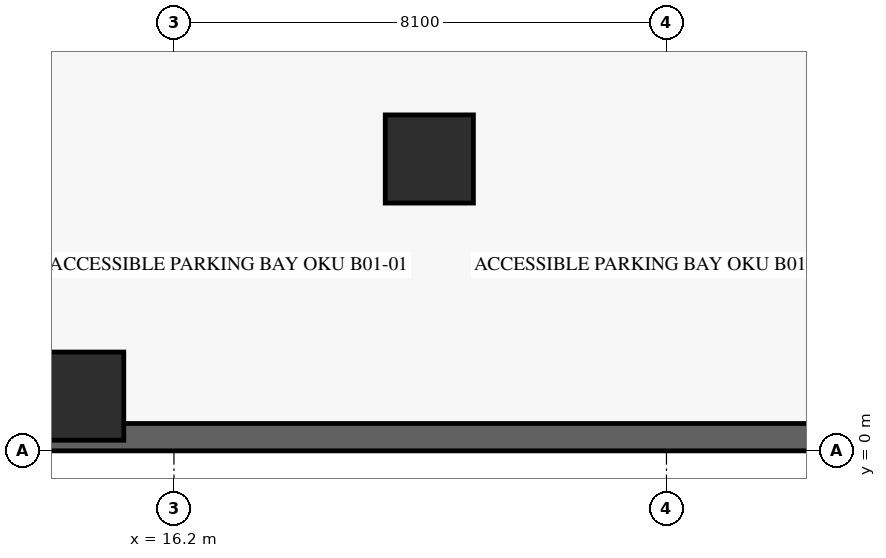
"""IFC4 building model, lengths in metres.
Left out: names, types, materials, properties, quantities, classifications, styles, units other than length and angle.
Written with IfcOpenShell. Run it as: python <this file> out.ifc"""

import sys

from ifc_helpers import new_model, si_unit, direction, frame, frame_2d, origin, origin_2d, place, context, subcontext, project, spatial, rectangle, extrude, source, transform, mapped, element, save


model = new_model("IFC4")
c1 = context("Model", 3, precision=1e-05, world=origin(), true_north=direction((0.0, 1.0)))
c2 = subcontext(c1, "Body", "Model", "MODEL_VIEW")
j1 = project(units=[si_unit("LENGTHUNIT", "METRE"), si_unit("PLANEANGLEUNIT", "RADIAN")], contexts=[c1])
p1 = place(None, origin())
s1 = spatial("IfcSite", under=j1, at=p1, CompositionType="ELEMENT")
p2 = place(p1, origin())
s2 = spatial("IfcBuilding", under=s1, at=p2, CompositionType="ELEMENT")
p3 = place(p2, frame((0.0, 0.0, -3.6)))
s3 = spatial("IfcBuildingStorey", under=s2, at=p3, CompositionType="ELEMENT", Elevation=-3.6)
p4 = place(p3, frame((0.225, 0.225, -0.36), z_axis=(0.0, 0.0, 1.0), x_axis=(1.0, 0.0, 0.0)))
e1 = element("IfcWall", 1, at=p4, inside=s3, PredefinedType="USERDEFINED", context=c2, shape_type="SweptSolid", body=[
    extrude(rectangle(XDim=64.35, YDim=0.45, at=frame_2d((32.175, 0.0))), origin(), (0.0, 0.0, 1.0), 3.578),
])
m1 = source(origin(), c2, "Body", "SweptSolid", [
    extrude(rectangle(XDim=1.45, YDim=1.45, at=origin_2d()), origin(), (0.0, 0.0, 1.0), 3.58),
])
for number, where, z_axis, x_axis in (
    (2, (20.4, 4.8, -0.36), (0.0, 0.0, 1.0), (1.0, 0.0, 0.0)),
    (3, (14.65, 0.9, -0.36), (0.0, 0.0, 1.0), (1.0, 0.0, 0.0)),
):
    element("IfcColumn", number, at=place(p3, frame(where, z_axis=z_axis, x_axis=x_axis)), inside=s3, PredefinedType="COLUMN", context=c2, shape_type="MappedRepresentation", body=[
        mapped(m1, transform((0.0, 0.0, 0.0), scale=1.0)),
    ])
save(model, sys.argv[1])
